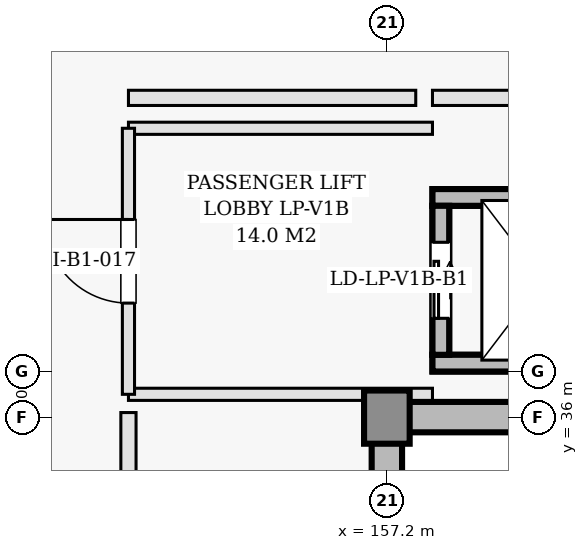
"""IFC4 building model, lengths in metres.
Left out: names, types, materials, properties, quantities, classifications, styles, units other than length and angle.
Written with IfcOpenShell. Run it as: python <this file> out.ifc"""

import sys

from ifc_helpers import new_model, si_unit, direction, frame, frame_2d, origin, origin_2d, place, context, subcontext, project, spatial, rectangle, extrude, element, fill, save


model = new_model("IFC4")
c1 = context("Model", 3, precision=1e-05, world=origin(), true_north=direction((0.0, 1.0)))
c2 = subcontext(c1, "Body", "Model", "MODEL_VIEW")
j1 = project(units=[si_unit("LENGTHUNIT", "METRE"), si_unit("PLANEANGLEUNIT", "RADIAN")], contexts=[c1])
p1 = place(None, origin())
s1 = spatial("IfcSite", under=j1, at=p1, CompositionType="ELEMENT")
p2 = place(p1, origin())
s2 = spatial("IfcBuilding", under=s1, at=p2, CompositionType="ELEMENT")
p3 = place(p2, frame((0.0, 0.0, -4.5)))
s3 = spatial("IfcBuildingStorey", under=s2, at=p3, CompositionType="ELEMENT", Elevation=-4.5)
p4 = place(p3, frame((157.2, 36.0, 0.0), z_axis=(0.0, 0.0, 1.0), x_axis=(1.0, 0.0, 0.0)))
e1 = element("IfcColumn", 1, at=p4, inside=s3, PredefinedType="COLUMN", context=c2, shape_type="SweptSolid", body=[
    extrude(rectangle(XDim=0.7, YDim=0.7, at=origin_2d()), origin(), (0.0, 0.0, 1.0), 4.5),
])
p5 = place(p3, frame((157.2, 14.4, 0.0), z_axis=(0.0, 0.0, 1.0), x_axis=(0.0, 1.0, 0.0)))
e2 = element("IfcWall", 2, at=p5, inside=s3, PredefinedType="USERDEFINED", context=c2, shape_type="SweptSolid", body=[
    extrude(rectangle(XDim=21.6, YDim=0.4, at=frame_2d((10.8, 0.0))), origin(), (0.0, 0.0, 1.0), 4.15),
])
p6 = place(p3, frame((157.2, 36.0, 0.0), z_axis=(0.0, 0.0, 1.0), x_axis=(1.0, 0.0, 0.0)))
e3 = element("IfcWall", 3, at=p6, inside=s3, PredefinedType="USERDEFINED", context=c2, shape_type="SweptSolid", body=[
    extrude(rectangle(XDim=9.0, YDim=0.4, at=frame_2d((4.5, 0.0))), origin(), (0.0, 0.0, 1.0), 4.15),
])
for number, where, z_axis, x_axis in (
    (4, (157.8, 36.71, -1.4), (0.0, 0.0, 1.0), (1.0, 0.0, 0.0)),
    (5, (157.8, 38.89, -1.4), (0.0, 0.0, 1.0), (1.0, 0.0, 0.0)),
):
    element("IfcWall", number, at=place(p3, frame(where, z_axis=z_axis, x_axis=x_axis)), inside=s3, PredefinedType="SHEAR", context=c2, shape_type="SweptSolid", body=[
        extrude(rectangle(XDim=2.9, YDim=0.22, at=frame_2d((1.45, 0.0))), origin(), (0.0, 0.0, 1.0), 0.9),
    ])
p7 = place(p3, frame((157.91, 36.82, -1.4), z_axis=(0.0, 0.0, 1.0), x_axis=(0.0, 1.0, 0.0)))
e6 = element("IfcWall", 6, at=p7, inside=s3, PredefinedType="SHEAR", context=c2, shape_type="SweptSolid", body=[
    extrude(rectangle(XDim=1.96, YDim=0.22, at=frame_2d((0.98, 0.0))), origin(), (0.0, 0.0, 1.0), 0.9),
])
for number, where, z_axis, x_axis in (
    (7, (157.8, 36.71, 0.0), (0.0, 0.0, 1.0), (1.0, 0.0, 0.0)),
    (8, (157.8, 38.89, 0.0), (0.0, 0.0, 1.0), (1.0, 0.0, 0.0)),
):
    element("IfcWall", number, at=place(p3, frame(where, z_axis=z_axis, x_axis=x_axis)), inside=s3, PredefinedType="SHEAR", context=c2, shape_type="SweptSolid", body=[
        extrude(rectangle(XDim=2.9, YDim=0.22, at=frame_2d((1.45, 0.0))), origin(), (0.0, 0.0, 1.0), 4.15),
    ])
p8 = place(p3, frame((157.91, 36.82, 0.0), z_axis=(0.0, 0.0, 1.0), x_axis=(0.0, 1.0, 0.0)))
e9 = element("IfcWall", 9, at=p8, inside=s3, PredefinedType="SHEAR", context=c2, shape_type="SweptSolid", body=[
    extrude(rectangle(XDim=1.96, YDim=0.22, at=frame_2d((0.98, 0.0))), origin(), (0.0, 0.0, 1.0), 4.15),
])
p9 = place(p8, frame((0.48, 0.0, 0.0)))
e10 = element("IfcOpeningElement", 10, at=p9, cuts=e9, PredefinedType="OPENING", context=c2, shape_type="SweptSolid", body=[
    extrude(rectangle(XDim=1.0, YDim=2.15, at=frame_2d((0.5, 1.075))), frame((0.0, 0.12, 0.0), z_axis=(0.0, -1.0, 0.0), x_axis=(1.0, 0.0, 0.0)), (0.0, 0.0, 1.0), 0.24),
])
p10 = place(p3, frame((153.8, 36.3, 0.0), z_axis=(0.0, 0.0, 1.0), x_axis=(1.0, 0.0, 0.0)))
e11 = element("IfcWall", 11, at=p10, inside=s3, PredefinedType="PARTITIONING", context=c2, shape_type="SweptSolid", body=[
    extrude(rectangle(XDim=4.0, YDim=0.16, at=frame_2d((2.0, 0.0))), origin(), (0.0, 0.0, 1.0), 3.335),
])
p11 = place(p3, frame((153.8, 39.8, 0.0), z_axis=(0.0, 0.0, 1.0), x_axis=(1.0, 0.0, 0.0)))
e12 = element("IfcWall", 12, at=p11, inside=s3, PredefinedType="PARTITIONING", context=c2, shape_type="SweptSolid", body=[
    extrude(rectangle(XDim=4.0, YDim=0.16, at=frame_2d((2.0, 0.0))), origin(), (0.0, 0.0, 1.0), 3.485),
])
p12 = place(p3, frame((153.8, 36.3, 0.0), z_axis=(0.0, 0.0, 1.0), x_axis=(0.0, 1.0, 0.0)))
e13 = element("IfcWall", 13, at=p12, inside=s3, PredefinedType="PARTITIONING", context=c2, shape_type="SweptSolid", body=[
    extrude(rectangle(XDim=3.5, YDim=0.16, at=frame_2d((1.75, 0.0))), origin(), (0.0, 0.0, 1.0), 3.585),
])
p13 = place(p12, frame((1.2, 0.0, 0.0)))
e14 = element("IfcOpeningElement", 14, at=p13, cuts=e13, PredefinedType="OPENING", context=c2, shape_type="SweptSolid", body=[
    extrude(rectangle(XDim=1.1, YDim=2.15, at=frame_2d((0.55, 1.075))), frame((0.0, 0.09, 0.0), z_axis=(0.0, -1.0, 0.0), x_axis=(1.0, 0.0, 0.0)), (0.0, 0.0, 1.0), 0.18),
])
p14 = place(p3, frame((157.8, 40.2, 0.0), z_axis=(0.0, 0.0, 1.0), x_axis=(1.0, 0.0, 0.0)))
e15 = element("IfcWall", 15, at=p14, inside=s3, PredefinedType="PARTITIONING", context=c2, shape_type="SweptSolid", body=[
    extrude(rectangle(XDim=2.58, YDim=0.2, at=frame_2d((1.29, 0.0))), origin(), (0.0, 0.0, 1.0), 4.15),
])
p15 = place(p3, frame((153.8, 40.2, 0.0), z_axis=(0.0, 0.0, 1.0), x_axis=(1.0, 0.0, 0.0)))
e16 = element("IfcWall", 16, at=p15, inside=s3, PredefinedType="PARTITIONING", context=c2, shape_type="SweptSolid", body=[
    extrude(rectangle(XDim=3.78, YDim=0.2, at=frame_2d((1.89, 0.0))), origin(), (0.0, 0.0, 1.0), 3.485),
])
p16 = place(p3, frame((153.8, 28.8, 0.0), z_axis=(0.0, 0.0, 1.0), x_axis=(0.0, 1.0, 0.0)))
e17 = element("IfcWall", 17, at=p16, inside=s3, PredefinedType="PARTITIONING", context=c2, shape_type="SweptSolid", body=[
    extrude(rectangle(XDim=7.26, YDim=0.2, at=frame_2d((3.63, 0.0))), origin(), (0.0, 0.0, 1.0), 3.335),
])
p17 = place(p9, origin())
e18 = element("IfcDoor", 18, at=p17, inside=s3, OperationType="SLIDING_TO_LEFT", PredefinedType="DOOR", context=c2, shape_type="SweptSolid", body=[
    extrude(rectangle(XDim=1.0, YDim=2.15, at=frame_2d((0.5, 1.075))), frame((0.0, 0.025, 0.0), z_axis=(0.0, -1.0, 0.0), x_axis=(1.0, 0.0, 0.0)), (0.0, 0.0, 1.0), 0.05),
])
fill(e10, e18)
p18 = place(p13, origin())
e19 = element("IfcDoor", 19, at=p18, inside=s3, OperationType="SINGLE_SWING_RIGHT", PredefinedType="DOOR", context=c2, shape_type="SweptSolid", body=[
    extrude(rectangle(XDim=1.1, YDim=2.15, at=frame_2d((0.55, 1.075))), frame((0.0, 0.025, 0.0), z_axis=(0.0, -1.0, 0.0), x_axis=(1.0, 0.0, 0.0)), (0.0, 0.0, 1.0), 0.05),
])
fill(e14, e19)
save(model, sys.argv[1])
